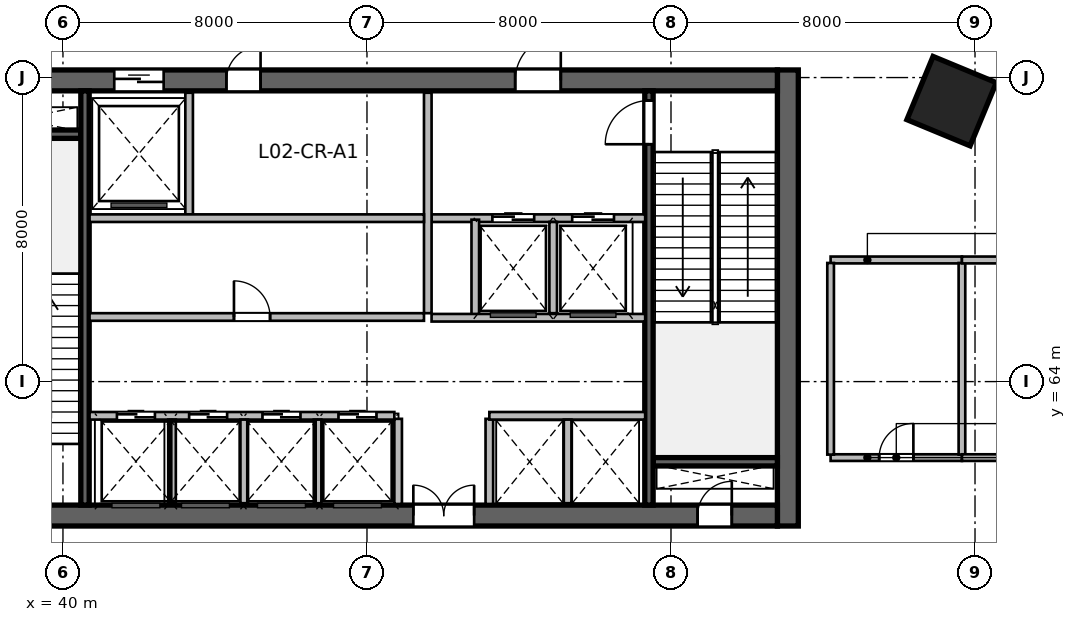
"""IFC4 building model, lengths in metres.
Left out: names, types, materials, properties, quantities, classifications, styles, units other than length and angle.
Written with IfcOpenShell. Run it as: python <this file> out.ifc"""

import sys

from ifc_helpers import new_model, si_unit, direction, frame, frame_2d, origin, origin_2d, place, context, subcontext, project, spatial, rectangle, extrude, source, transform, mapped, element, fill, save


model = new_model("IFC4")
c1 = context("Model", 3, precision=1e-05, world=origin(), true_north=direction((0.0, 1.0)))
c2 = subcontext(c1, "Body", "Model", "MODEL_VIEW")
j1 = project(units=[si_unit("LENGTHUNIT", "METRE"), si_unit("PLANEANGLEUNIT", "RADIAN")], contexts=[c1])
p1 = place(None, origin())
s1 = spatial("IfcSite", under=j1, at=p1, CompositionType="ELEMENT")
p2 = place(p1, origin())
s2 = spatial("IfcBuilding", under=s1, at=p2, CompositionType="ELEMENT")
p3 = place(p2, frame((0.0, 0.0, 12.0)))
s3 = spatial("IfcBuildingStorey", under=s2, at=p3, CompositionType="ELEMENT", Elevation=12.0)
m1 = source(origin(), c2, "Body", "SweptSolid", [
    extrude(rectangle(XDim=12.0, YDim=0.55, at=frame_2d((6.0, 0.0))), origin(), (0.0, 0.0, 1.0), 6.0),
])
p4 = place(p3, frame((59.075, 60.2, 0.0), z_axis=(0.0, 0.0, 1.0), x_axis=(0.0, 1.0, 0.0)))
e1 = element("IfcWall", 1, at=p4, inside=s3, PredefinedType="SHEAR", context=c2, shape_type="MappedRepresentation", body=[
    mapped(m1, transform((0.0, 0.0, 0.0), scale=1.0)),
])
m2 = source(origin(), c2, "Body", "SweptSolid", [
    extrude(rectangle(XDim=21.6, YDim=0.55, at=frame_2d((10.8, 0.0))), origin(), (0.0, 0.0, 1.0), 6.0),
])
p5 = place(p3, frame((37.2, 60.475, 0.0), z_axis=(0.0, 0.0, 1.0), x_axis=(1.0, 0.0, 0.0)))
e2 = element("IfcWall", 2, at=p5, inside=s3, PredefinedType="SHEAR", context=c2, shape_type="MappedRepresentation", body=[
    mapped(m2, transform((0.0, 0.0, 0.0), scale=1.0)),
])
p6 = place(p5, frame((1.1, 0.0, 0.0)))
e3 = element("IfcOpeningElement", 3, at=p6, cuts=e2, PredefinedType="OPENING", context=c2, shape_type="SweptSolid", body=[
    extrude(rectangle(XDim=1.15, YDim=2.15, at=frame_2d((0.575, 1.075))), frame((0.0, 0.285, 0.0), z_axis=(0.0, -1.0, 0.0), x_axis=(1.0, 0.0, 0.0)), (0.0, 0.0, 1.0), 0.57),
])
p7 = place(p5, frame((19.5, 0.0, 0.0)))
e4 = element("IfcOpeningElement", 4, at=p7, cuts=e2, PredefinedType="OPENING", context=c2, shape_type="SweptSolid", body=[
    extrude(rectangle(XDim=0.9, YDim=2.1, at=frame_2d((0.45, 1.05))), frame((0.0, 0.285, 0.0), z_axis=(0.0, -1.0, 0.0), x_axis=(1.0, 0.0, 0.0)), (0.0, 0.0, 1.0), 0.57),
])
p8 = place(p5, frame((12.02, 0.0, 0.0)))
e5 = element("IfcOpeningElement", 5, at=p8, cuts=e2, PredefinedType="OPENING", context=c2, shape_type="SweptSolid", body=[
    extrude(rectangle(XDim=1.6, YDim=2.15, at=frame_2d((0.8, 1.075))), frame((0.0, 0.285, 0.0), z_axis=(0.0, -1.0, 0.0), x_axis=(1.0, 0.0, 0.0)), (0.0, 0.0, 1.0), 0.57),
])
p9 = place(p3, frame((37.2, 71.925, 0.0), z_axis=(0.0, 0.0, 1.0), x_axis=(1.0, 0.0, 0.0)))
e6 = element("IfcWall", 6, at=p9, inside=s3, PredefinedType="SHEAR", context=c2, shape_type="MappedRepresentation", body=[
    mapped(m2, transform((0.0, 0.0, 0.0), scale=1.0)),
])
p10 = place(p9, frame((1.2, 0.0, 0.0)))
e7 = element("IfcOpeningElement", 7, at=p10, cuts=e6, PredefinedType="OPENING", context=c2, shape_type="SweptSolid", body=[
    extrude(rectangle(XDim=0.9, YDim=2.1, at=frame_2d((0.45, 1.05))), frame((0.0, 0.285, 0.0), z_axis=(0.0, -1.0, 0.0), x_axis=(1.0, 0.0, 0.0)), (0.0, 0.0, 1.0), 0.57),
])
p11 = place(p9, frame((14.7, 0.0, 0.0)))
e8 = element("IfcOpeningElement", 8, at=p11, cuts=e6, PredefinedType="OPENING", context=c2, shape_type="SweptSolid", body=[
    extrude(rectangle(XDim=1.2, YDim=2.15, at=frame_2d((0.6, 1.075))), frame((0.0, 0.285, 0.0), z_axis=(0.0, -1.0, 0.0), x_axis=(1.0, 0.0, 0.0)), (0.0, 0.0, 1.0), 0.57),
])
p12 = place(p9, frame((4.15, 0.0, 0.0)))
e9 = element("IfcOpeningElement", 9, at=p12, cuts=e6, PredefinedType="OPENING", context=c2, shape_type="SweptSolid", body=[
    extrude(rectangle(XDim=1.3, YDim=2.15, at=frame_2d((0.65, 1.075))), frame((0.0, 0.285, 0.0), z_axis=(0.0, -1.0, 0.0), x_axis=(1.0, 0.0, 0.0)), (0.0, 0.0, 1.0), 0.57),
])
p13 = place(p9, frame((7.1, 0.0, 0.0)))
e10 = element("IfcOpeningElement", 10, at=p13, cuts=e6, PredefinedType="OPENING", context=c2, shape_type="SweptSolid", body=[
    extrude(rectangle(XDim=0.9, YDim=2.1, at=frame_2d((0.45, 1.05))), frame((0.0, 0.285, 0.0), z_axis=(0.0, -1.0, 0.0), x_axis=(1.0, 0.0, 0.0)), (0.0, 0.0, 1.0), 0.57),
])
m3 = source(origin(), c2, "Body", "SweptSolid", [
    extrude(rectangle(XDim=3.27, YDim=0.22, at=frame_2d((1.635, 0.0))), origin(), (0.0, 0.0, 1.0), 6.0),
])
for number, where, z_axis, x_axis in (
    (11, (37.2, 70.51, 0.0), (0.0, 0.0, 1.0), (1.0, 0.0, 0.0)),
    (12, (55.53, 61.89, 0.0), (0.0, 0.0, 1.0), (1.0, 0.0, 0.0)),
):
    element("IfcWall", number, at=place(p3, frame(where, z_axis=z_axis, x_axis=x_axis)), inside=s3, PredefinedType="SHEAR", context=c2, shape_type="MappedRepresentation", body=[
        mapped(m3, transform((0.0, 0.0, 0.0), scale=1.0)),
    ])
m4 = source(origin(), c2, "Body", "SweptSolid", [
    extrude(rectangle(XDim=10.9, YDim=0.22, at=frame_2d((5.45, 0.0))), origin(), (0.0, 0.0, 1.0), 6.0),
])
p14 = place(p3, frame((40.58, 60.75, 0.0), z_axis=(0.0, 0.0, 1.0), x_axis=(0.0, 1.0, 0.0)))
e13 = element("IfcWall", 13, at=p14, inside=s3, PredefinedType="SHEAR", context=c2, shape_type="MappedRepresentation", body=[
    mapped(m4, transform((0.0, 0.0, 0.0), scale=1.0)),
])
p15 = place(p3, frame((55.42, 60.75, 0.0), z_axis=(0.0, 0.0, 1.0), x_axis=(0.0, 1.0, 0.0)))
e14 = element("IfcWall", 14, at=p15, inside=s3, PredefinedType="SHEAR", context=c2, shape_type="MappedRepresentation", body=[
    mapped(m4, transform((0.0, 0.0, 0.0), scale=1.0)),
])
p16 = place(p15, frame((9.495, 0.0, 0.0)))
e15 = element("IfcOpeningElement", 15, at=p16, cuts=e14, PredefinedType="OPENING", context=c2, shape_type="SweptSolid", body=[
    extrude(rectangle(XDim=1.15, YDim=2.15, at=frame_2d((0.575, 1.075))), frame((0.0, 0.12, 0.0), z_axis=(0.0, -1.0, 0.0), x_axis=(1.0, 0.0, 0.0)), (0.0, 0.0, 1.0), 0.24),
])
m5 = source(origin(), c2, "Body", "SweptSolid", [
    extrude(rectangle(XDim=1.8, YDim=1.8, at=origin_2d()), origin(), (0.0, 0.0, 1.0), 6.0),
])
p17 = place(p3, frame((63.384, 71.379, 0.0), z_axis=(0.0, 0.0, 1.0), x_axis=(0.382683432365, 0.923879532511, 0.0)))
e16 = element("IfcColumn", 16, at=p17, inside=s3, PredefinedType="COLUMN", context=c2, shape_type="MappedRepresentation", body=[
    mapped(m5, transform((0.0, 0.0, 0.0), scale=1.0)),
])
m6 = source(origin(), c2, "Body", "SweptSolid", [
    extrude(rectangle(XDim=2.24, YDim=0.2, at=frame_2d((1.12, 0.0))), origin(), (0.0, 0.0, 1.0), 5.7),
])
for number, where, z_axis, x_axis in (
    (17, (48.82, 60.78, 0.0), (0.0, 0.0, 1.0), (0.0, 1.0, 0.0)),
    (18, (51.22, 60.78, 0.0), (0.0, 0.0, 1.0), (0.0, 1.0, 0.0)),
):
    element("IfcWall", number, at=place(p3, frame(where, z_axis=z_axis, x_axis=x_axis)), inside=s3, PredefinedType="SOLIDWALL", context=c2, shape_type="MappedRepresentation", body=[
        mapped(m6, transform((0.0, 0.0, 0.0), scale=1.0)),
    ])
m7 = source(origin(), c2, "Body", "SweptSolid", [
    extrude(rectangle(XDim=5.62, YDim=0.2, at=frame_2d((2.81, 0.0))), origin(), (0.0, 0.0, 1.0), 5.7),
])
p18 = place(p3, frame((49.7, 68.3, 0.0), z_axis=(0.0, 0.0, 1.0), x_axis=(1.0, 0.0, 0.0)))
e19 = element("IfcWall", 19, at=p18, inside=s3, PredefinedType="SOLIDWALL", context=c2, shape_type="MappedRepresentation", body=[
    mapped(m7, transform((0.0, 0.0, 0.0), scale=1.0)),
])
p19 = place(p18, frame((1.6, 0.0, 0.0)))
e20 = element("IfcOpeningElement", 20, at=p19, cuts=e19, PredefinedType="OPENING", context=c2, shape_type="SweptSolid", body=[
    extrude(rectangle(XDim=1.1, YDim=2.15, at=frame_2d((0.55, 1.075))), frame((0.0, 0.11, 0.0), z_axis=(0.0, -1.0, 0.0), x_axis=(1.0, 0.0, 0.0)), (0.0, 0.0, 1.0), 0.22),
])
p20 = place(p18, frame((3.7, 0.0, 0.0)))
e21 = element("IfcOpeningElement", 21, at=p20, cuts=e19, PredefinedType="OPENING", context=c2, shape_type="SweptSolid", body=[
    extrude(rectangle(XDim=1.1, YDim=2.15, at=frame_2d((0.55, 1.075))), frame((0.0, 0.11, 0.0), z_axis=(0.0, -1.0, 0.0), x_axis=(1.0, 0.0, 0.0)), (0.0, 0.0, 1.0), 0.22),
])
m8 = source(origin(), c2, "Body", "SweptSolid", [
    extrude(rectangle(XDim=5.8, YDim=0.2, at=frame_2d((2.9, 0.0))), origin(), (0.0, 0.0, 1.0), 5.7),
])
p21 = place(p3, frame((49.6, 65.8, 0.0), z_axis=(0.0, 0.0, 1.0), x_axis=(0.0, 1.0, 0.0)))
e22 = element("IfcWall", 22, at=p21, inside=s3, PredefinedType="SOLIDWALL", context=c2, shape_type="MappedRepresentation", body=[
    mapped(m8, transform((0.0, 0.0, 0.0), scale=1.0)),
])
m9 = source(origin(), c2, "Body", "SweptSolid", [
    extrude(rectangle(XDim=2.58, YDim=0.2, at=frame_2d((1.29, 0.0))), origin(), (0.0, 0.0, 1.0), 5.7),
])
p22 = place(p3, frame((50.85, 65.68, 0.0), z_axis=(0.0, 0.0, 1.0), x_axis=(0.0, 1.0, 0.0)))
e23 = element("IfcWall", 23, at=p22, inside=s3, PredefinedType="SOLIDWALL", context=c2, shape_type="MappedRepresentation", body=[
    mapped(m9, transform((0.0, 0.0, 0.0), scale=1.0)),
])
m10 = source(origin(), c2, "Body", "SweptSolid", [
    extrude(rectangle(XDim=2.4, YDim=0.2, at=frame_2d((1.2, 0.0))), origin(), (0.0, 0.0, 1.0), 5.7),
])
p23 = place(p3, frame((52.9, 65.8, 0.0), z_axis=(0.0, 0.0, 1.0), x_axis=(0.0, 1.0, 0.0)))
e24 = element("IfcWall", 24, at=p23, inside=s3, PredefinedType="SOLIDWALL", context=c2, shape_type="MappedRepresentation", body=[
    mapped(m10, transform((0.0, 0.0, 0.0), scale=1.0)),
])
p24 = place(p3, frame((49.7, 65.68, 0.0), z_axis=(0.0, 0.0, 1.0), x_axis=(1.0, 0.0, 0.0)))
e25 = element("IfcWall", 25, at=p24, inside=s3, PredefinedType="SOLIDWALL", context=c2, shape_type="MappedRepresentation", body=[
    mapped(m7, transform((0.0, 0.0, 0.0), scale=1.0)),
])
m11 = source(origin(), c2, "Body", "SweptSolid", [
    extrude(rectangle(XDim=3.2, YDim=0.2, at=frame_2d((1.6, 0.0))), origin(), (0.0, 0.0, 1.0), 5.7),
])
p25 = place(p3, frame((43.32, 68.4, 0.0), z_axis=(0.0, 0.0, 1.0), x_axis=(0.0, 1.0, 0.0)))
e26 = element("IfcWall", 26, at=p25, inside=s3, PredefinedType="SOLIDWALL", context=c2, shape_type="MappedRepresentation", body=[
    mapped(m11, transform((0.0, 0.0, 0.0), scale=1.0)),
])
m12 = source(origin(), c2, "Body", "SweptSolid", [
    extrude(rectangle(XDim=8.8, YDim=0.2, at=frame_2d((4.4, 0.0))), origin(), (0.0, 0.0, 1.0), 5.7),
])
p26 = place(p3, frame((40.7, 68.3, 0.0), z_axis=(0.0, 0.0, 1.0), x_axis=(1.0, 0.0, 0.0)))
e27 = element("IfcWall", 27, at=p26, inside=s3, PredefinedType="SOLIDWALL", context=c2, shape_type="MappedRepresentation", body=[
    mapped(m12, transform((0.0, 0.0, 0.0), scale=1.0)),
])
m13 = source(origin(), c2, "Body", "SweptSolid", [
    extrude(rectangle(XDim=8.02, YDim=0.2, at=frame_2d((4.01, 0.0))), origin(), (0.0, 0.0, 1.0), 5.7),
])
p27 = place(p3, frame((40.7, 63.1, 0.0), z_axis=(0.0, 0.0, 1.0), x_axis=(1.0, 0.0, 0.0)))
e28 = element("IfcWall", 28, at=p27, inside=s3, PredefinedType="SOLIDWALL", context=c2, shape_type="MappedRepresentation", body=[
    mapped(m13, transform((0.0, 0.0, 0.0), scale=1.0)),
])
p28 = place(p27, frame((0.72, 0.0, 0.0)))
e29 = element("IfcOpeningElement", 29, at=p28, cuts=e28, PredefinedType="OPENING", context=c2, shape_type="SweptSolid", body=[
    extrude(rectangle(XDim=1.0, YDim=2.15, at=frame_2d((0.5, 1.075))), frame((0.0, 0.11, 0.0), z_axis=(0.0, -1.0, 0.0), x_axis=(1.0, 0.0, 0.0)), (0.0, 0.0, 1.0), 0.22),
])
p29 = place(p27, frame((2.62, 0.0, 0.0)))
e30 = element("IfcOpeningElement", 30, at=p29, cuts=e28, PredefinedType="OPENING", context=c2, shape_type="SweptSolid", body=[
    extrude(rectangle(XDim=1.0, YDim=2.15, at=frame_2d((0.5, 1.075))), frame((0.0, 0.11, 0.0), z_axis=(0.0, -1.0, 0.0), x_axis=(1.0, 0.0, 0.0)), (0.0, 0.0, 1.0), 0.22),
])
p30 = place(p27, frame((4.55, 0.0, 0.0)))
e31 = element("IfcOpeningElement", 31, at=p30, cuts=e28, PredefinedType="OPENING", context=c2, shape_type="SweptSolid", body=[
    extrude(rectangle(XDim=1.0, YDim=2.15, at=frame_2d((0.5, 1.075))), frame((0.0, 0.11, 0.0), z_axis=(0.0, -1.0, 0.0), x_axis=(1.0, 0.0, 0.0)), (0.0, 0.0, 1.0), 0.22),
])
p31 = place(p27, frame((6.55, 0.0, 0.0)))
e32 = element("IfcOpeningElement", 32, at=p31, cuts=e28, PredefinedType="OPENING", context=c2, shape_type="SweptSolid", body=[
    extrude(rectangle(XDim=1.0, YDim=2.15, at=frame_2d((0.5, 1.075))), frame((0.0, 0.11, 0.0), z_axis=(0.0, -1.0, 0.0), x_axis=(1.0, 0.0, 0.0)), (0.0, 0.0, 1.0), 0.22),
])
m14 = source(origin(), c2, "Body", "SweptSolid", [
    extrude(rectangle(XDim=4.1, YDim=0.2, at=frame_2d((2.05, 0.0))), origin(), (0.0, 0.0, 1.0), 5.7),
])
p32 = place(p3, frame((51.22, 63.1, 0.0), z_axis=(0.0, 0.0, 1.0), x_axis=(1.0, 0.0, 0.0)))
e33 = element("IfcWall", 33, at=p32, inside=s3, PredefinedType="SOLIDWALL", context=c2, shape_type="MappedRepresentation", body=[
    mapped(m14, transform((0.0, 0.0, 0.0), scale=1.0)),
])
m15 = source(origin(), c2, "Body", "SweptSolid", [
    extrude(rectangle(XDim=2.2, YDim=0.2, at=frame_2d((1.1, 0.0))), origin(), (0.0, 0.0, 1.0), 5.7),
])
for number, where, z_axis, x_axis in (
    (34, (42.87, 60.8, 0.0), (0.0, 0.0, 1.0), (0.0, 1.0, 0.0)),
    (35, (44.77, 60.8, 0.0), (0.0, 0.0, 1.0), (0.0, 1.0, 0.0)),
    (36, (46.7, 60.8, 0.0), (0.0, 0.0, 1.0), (0.0, 1.0, 0.0)),
    (37, (53.28, 60.8, 0.0), (0.0, 0.0, 1.0), (0.0, 1.0, 0.0)),
):
    element("IfcWall", number, at=place(p3, frame(where, z_axis=z_axis, x_axis=x_axis)), inside=s3, PredefinedType="SOLIDWALL", context=c2, shape_type="MappedRepresentation", body=[
        mapped(m15, transform((0.0, 0.0, 0.0), scale=1.0)),
    ])
p33 = place(p3, frame((40.7, 65.7, 0.0), z_axis=(0.0, 0.0, 1.0), x_axis=(1.0, 0.0, 0.0)))
e38 = element("IfcWall", 38, at=p33, inside=s3, PredefinedType="SOLIDWALL", context=c2, shape_type="MappedRepresentation", body=[
    mapped(m12, transform((0.0, 0.0, 0.0), scale=1.0)),
])
p34 = place(p33, frame((3.8, 0.0, 0.0)))
e39 = element("IfcOpeningElement", 39, at=p34, cuts=e38, PredefinedType="OPENING", context=c2, shape_type="SweptSolid", body=[
    extrude(rectangle(XDim=0.95, YDim=2.15, at=frame_2d((0.475, 1.075))), frame((0.0, 0.11, 0.0), z_axis=(0.0, -1.0, 0.0), x_axis=(1.0, 0.0, 0.0)), (0.0, 0.0, 1.0), 0.22),
])
m16 = source(origin(), c2, "Body", "SweptSolid", [
    extrude(rectangle(XDim=3.456, YDim=0.175, at=frame_2d((1.728, 0.0))), origin(), (0.0, 0.0, 1.0), 5.7),
])
p35 = place(p3, frame((60.2, 62.0, 0.0), z_axis=(0.0, 0.0, 1.0), x_axis=(1.0, 0.0, 0.0)))
e40 = element("IfcWall", 40, at=p35, inside=s3, PredefinedType="PARTITIONING", context=c2, shape_type="MappedRepresentation", body=[
    mapped(m16, transform((0.0, 0.0, 0.0), scale=1.0)),
])
p36 = place(p35, frame((1.278, 0.0, 0.0)))
e41 = element("IfcOpeningElement", 41, at=p36, cuts=e40, PredefinedType="OPENING", context=c2, shape_type="SweptSolid", body=[
    extrude(rectangle(XDim=0.9, YDim=2.08, at=frame_2d((0.45, 1.04))), frame((0.0, 0.098, 0.0), z_axis=(0.0, -1.0, 0.0), x_axis=(1.0, 0.0, 0.0)), (0.0, 0.0, 1.0), 0.195),
])
m17 = source(origin(), c2, "Body", "SweptSolid", [
    extrude(rectangle(XDim=3.456, YDim=0.18, at=frame_2d((1.728, 0.0))), origin(), (0.0, 0.0, 1.0), 5.7),
])
p37 = place(p3, frame((60.2, 67.2, 0.0), z_axis=(0.0, 0.0, 1.0), x_axis=(1.0, 0.0, 0.0)))
e42 = element("IfcWall", 42, at=p37, inside=s3, PredefinedType="PLUMBINGWALL", context=c2, shape_type="MappedRepresentation", body=[
    mapped(m17, transform((0.0, 0.0, 0.0), scale=1.0)),
])
m18 = source(origin(), c2, "Body", "SweptSolid", [
    extrude(rectangle(XDim=5.043, YDim=0.175, at=frame_2d((2.521, 0.0))), origin(), (0.0, 0.0, 1.0), 5.7),
])
for number, where, z_axis, x_axis in (
    (43, (60.2, 62.079, 0.0), (0.0, 0.0, 1.0), (0.0, 1.0, 0.0)),
    (44, (63.656, 62.079, 0.0), (0.0, 0.0, 1.0), (0.0, 1.0, 0.0)),
):
    element("IfcWall", number, at=place(p3, frame(where, z_axis=z_axis, x_axis=x_axis)), inside=s3, PredefinedType="PARTITIONING", context=c2, shape_type="MappedRepresentation", body=[
        mapped(m18, transform((0.0, 0.0, 0.0), scale=1.0)),
    ])
p38 = place(p3, frame((63.656, 62.0, 0.0), z_axis=(0.0, 0.0, 1.0), x_axis=(1.0, 0.0, 0.0)))
e45 = element("IfcWall", 45, at=p38, inside=s3, PredefinedType="PARTITIONING", context=c2, shape_type="MappedRepresentation", body=[
    mapped(m16, transform((0.0, 0.0, 0.0), scale=1.0)),
])
p39 = place(p38, frame((1.278, 0.0, 0.0)))
e46 = element("IfcOpeningElement", 46, at=p39, cuts=e45, PredefinedType="OPENING", context=c2, shape_type="SweptSolid", body=[
    extrude(rectangle(XDim=0.9, YDim=2.08, at=frame_2d((0.45, 1.04))), frame((0.0, 0.098, 0.0), z_axis=(0.0, -1.0, 0.0), x_axis=(1.0, 0.0, 0.0)), (0.0, 0.0, 1.0), 0.195),
])
p40 = place(p3, frame((63.656, 67.2, 0.0), z_axis=(0.0, 0.0, 1.0), x_axis=(1.0, 0.0, 0.0)))
e47 = element("IfcWall", 47, at=p40, inside=s3, PredefinedType="PLUMBINGWALL", context=c2, shape_type="MappedRepresentation", body=[
    mapped(m17, transform((0.0, 0.0, 0.0), scale=1.0)),
])
m19 = source(origin(), c2, "Body", "SweptSolid", [
    extrude(rectangle(XDim=0.9, YDim=2.1, at=frame_2d((0.45, 1.05))), frame((0.0, 0.025, 0.0), z_axis=(0.0, -1.0, 0.0), x_axis=(1.0, 0.0, 0.0)), (0.0, 0.0, 1.0), 0.05),
])
p41 = place(p7, origin())
e48 = element("IfcDoor", 48, at=p41, inside=s3, OperationType="SINGLE_SWING_RIGHT", PredefinedType="DOOR", context=c2, shape_type="MappedRepresentation", body=[
    mapped(m19, transform((0.0, 0.0, 0.0), scale=1.0)),
])
fill(e4, e48)
m20 = source(origin(), c2, "Body", "SweptSolid", [
    extrude(rectangle(XDim=1.15, YDim=2.15, at=frame_2d((0.575, 1.075))), frame((0.0, 0.025, 0.0), z_axis=(0.0, -1.0, 0.0), x_axis=(1.0, 0.0, 0.0)), (0.0, 0.0, 1.0), 0.05),
])
p42 = place(p16, origin())
e49 = element("IfcDoor", 49, at=p42, inside=s3, OperationType="SINGLE_SWING_LEFT", PredefinedType="DOOR", context=c2, shape_type="MappedRepresentation", body=[
    mapped(m20, transform((0.0, 0.0, 0.0), scale=1.0)),
])
fill(e15, e49)
m21 = source(origin(), c2, "Body", "SweptSolid", [
    extrude(rectangle(XDim=1.6, YDim=2.15, at=frame_2d((0.8, 1.075))), frame((0.0, 0.025, 0.0), z_axis=(0.0, -1.0, 0.0), x_axis=(1.0, 0.0, 0.0)), (0.0, 0.0, 1.0), 0.05),
])
p43 = place(p8, origin())
e50 = element("IfcDoor", 50, at=p43, inside=s3, OperationType="DOUBLE_DOOR_SINGLE_SWING", PredefinedType="DOOR", context=c2, shape_type="MappedRepresentation", body=[
    mapped(m21, transform((0.0, 0.0, 0.0), scale=1.0)),
])
fill(e5, e50)
m22 = source(origin(), c2, "Body", "SweptSolid", [
    extrude(rectangle(XDim=1.2, YDim=2.15, at=frame_2d((0.6, 1.075))), frame((0.0, 0.025, 0.0), z_axis=(0.0, -1.0, 0.0), x_axis=(1.0, 0.0, 0.0)), (0.0, 0.0, 1.0), 0.05),
])
p44 = place(p11, origin())
e51 = element("IfcDoor", 51, at=p44, inside=s3, OperationType="SINGLE_SWING_RIGHT", PredefinedType="DOOR", context=c2, shape_type="MappedRepresentation", body=[
    mapped(m22, transform((0.0, 0.0, 0.0), scale=1.0)),
])
fill(e8, e51)
m23 = source(origin(), c2, "Body", "SweptSolid", [
    extrude(rectangle(XDim=1.1, YDim=2.15, at=frame_2d((0.55, 1.075))), frame((0.0, 0.025, 0.0), z_axis=(0.0, -1.0, 0.0), x_axis=(1.0, 0.0, 0.0)), (0.0, 0.0, 1.0), 0.05),
])
p45 = place(p19, origin())
e52 = element("IfcDoor", 52, at=p45, inside=s3, OperationType="DOUBLE_DOOR_SLIDING", PredefinedType="DOOR", context=c2, shape_type="MappedRepresentation", body=[
    mapped(m23, transform((0.0, 0.0, 0.0), scale=1.0)),
])
fill(e20, e52)
p46 = place(p20, origin())
e53 = element("IfcDoor", 53, at=p46, inside=s3, OperationType="DOUBLE_DOOR_SLIDING", PredefinedType="DOOR", context=c2, shape_type="MappedRepresentation", body=[
    mapped(m23, transform((0.0, 0.0, 0.0), scale=1.0)),
])
fill(e21, e53)
m24 = source(origin(), c2, "Body", "SweptSolid", [
    extrude(rectangle(XDim=1.3, YDim=2.15, at=frame_2d((0.65, 1.075))), frame((0.0, 0.025, 0.0), z_axis=(0.0, -1.0, 0.0), x_axis=(1.0, 0.0, 0.0)), (0.0, 0.0, 1.0), 0.05),
])
p47 = place(p12, origin())
e54 = element("IfcDoor", 54, at=p47, inside=s3, OperationType="DOUBLE_DOOR_SLIDING", PredefinedType="DOOR", context=c2, shape_type="MappedRepresentation", body=[
    mapped(m24, transform((0.0, 0.0, 0.0), scale=1.0)),
])
fill(e9, e54)
p48 = place(p13, origin())
e55 = element("IfcDoor", 55, at=p48, inside=s3, OperationType="SINGLE_SWING_RIGHT", PredefinedType="DOOR", context=c2, shape_type="MappedRepresentation", body=[
    mapped(m19, transform((0.0, 0.0, 0.0), scale=1.0)),
])
fill(e10, e55)
m25 = source(origin(), c2, "Body", "SweptSolid", [
    extrude(rectangle(XDim=1.0, YDim=2.15, at=frame_2d((0.5, 1.075))), frame((0.0, 0.025, 0.0), z_axis=(0.0, -1.0, 0.0), x_axis=(1.0, 0.0, 0.0)), (0.0, 0.0, 1.0), 0.05),
])
p49 = place(p28, origin())
e56 = element("IfcDoor", 56, at=p49, inside=s3, OperationType="DOUBLE_DOOR_SLIDING", PredefinedType="DOOR", context=c2, shape_type="MappedRepresentation", body=[
    mapped(m25, transform((0.0, 0.0, 0.0), scale=1.0)),
])
fill(e29, e56)
p50 = place(p29, origin())
e57 = element("IfcDoor", 57, at=p50, inside=s3, OperationType="DOUBLE_DOOR_SLIDING", PredefinedType="DOOR", context=c2, shape_type="MappedRepresentation", body=[
    mapped(m25, transform((0.0, 0.0, 0.0), scale=1.0)),
])
fill(e30, e57)
p51 = place(p30, origin())
e58 = element("IfcDoor", 58, at=p51, inside=s3, OperationType="DOUBLE_DOOR_SLIDING", PredefinedType="DOOR", context=c2, shape_type="MappedRepresentation", body=[
    mapped(m25, transform((0.0, 0.0, 0.0), scale=1.0)),
])
fill(e31, e58)
p52 = place(p31, origin())
e59 = element("IfcDoor", 59, at=p52, inside=s3, OperationType="DOUBLE_DOOR_SLIDING", PredefinedType="DOOR", context=c2, shape_type="MappedRepresentation", body=[
    mapped(m25, transform((0.0, 0.0, 0.0), scale=1.0)),
])
fill(e32, e59)
m26 = source(origin(), c2, "Body", "SweptSolid", [
    extrude(rectangle(XDim=0.95, YDim=2.15, at=frame_2d((0.475, 1.075))), frame((0.0, 0.025, 0.0), z_axis=(0.0, -1.0, 0.0), x_axis=(1.0, 0.0, 0.0)), (0.0, 0.0, 1.0), 0.05),
])
p53 = place(p34, origin())
e60 = element("IfcDoor", 60, at=p53, inside=s3, OperationType="SINGLE_SWING_LEFT", PredefinedType="DOOR", context=c2, shape_type="MappedRepresentation", body=[
    mapped(m26, transform((0.0, 0.0, 0.0), scale=1.0)),
])
fill(e39, e60)
m27 = source(origin(), c2, "Body", "SweptSolid", [
    extrude(rectangle(XDim=0.9, YDim=2.08, at=frame_2d((0.45, 1.04))), frame((0.0, 0.025, 0.0), z_axis=(0.0, -1.0, 0.0), x_axis=(1.0, 0.0, 0.0)), (0.0, 0.0, 1.0), 0.05),
])
p54 = place(p36, origin())
e61 = element("IfcDoor", 61, at=p54, inside=s3, OperationType="SINGLE_SWING_RIGHT", PredefinedType="DOOR", context=c2, shape_type="MappedRepresentation", body=[
    mapped(m27, transform((0.0, 0.0, 0.0), scale=1.0)),
])
fill(e41, e61)
save(model, sys.argv[1])
